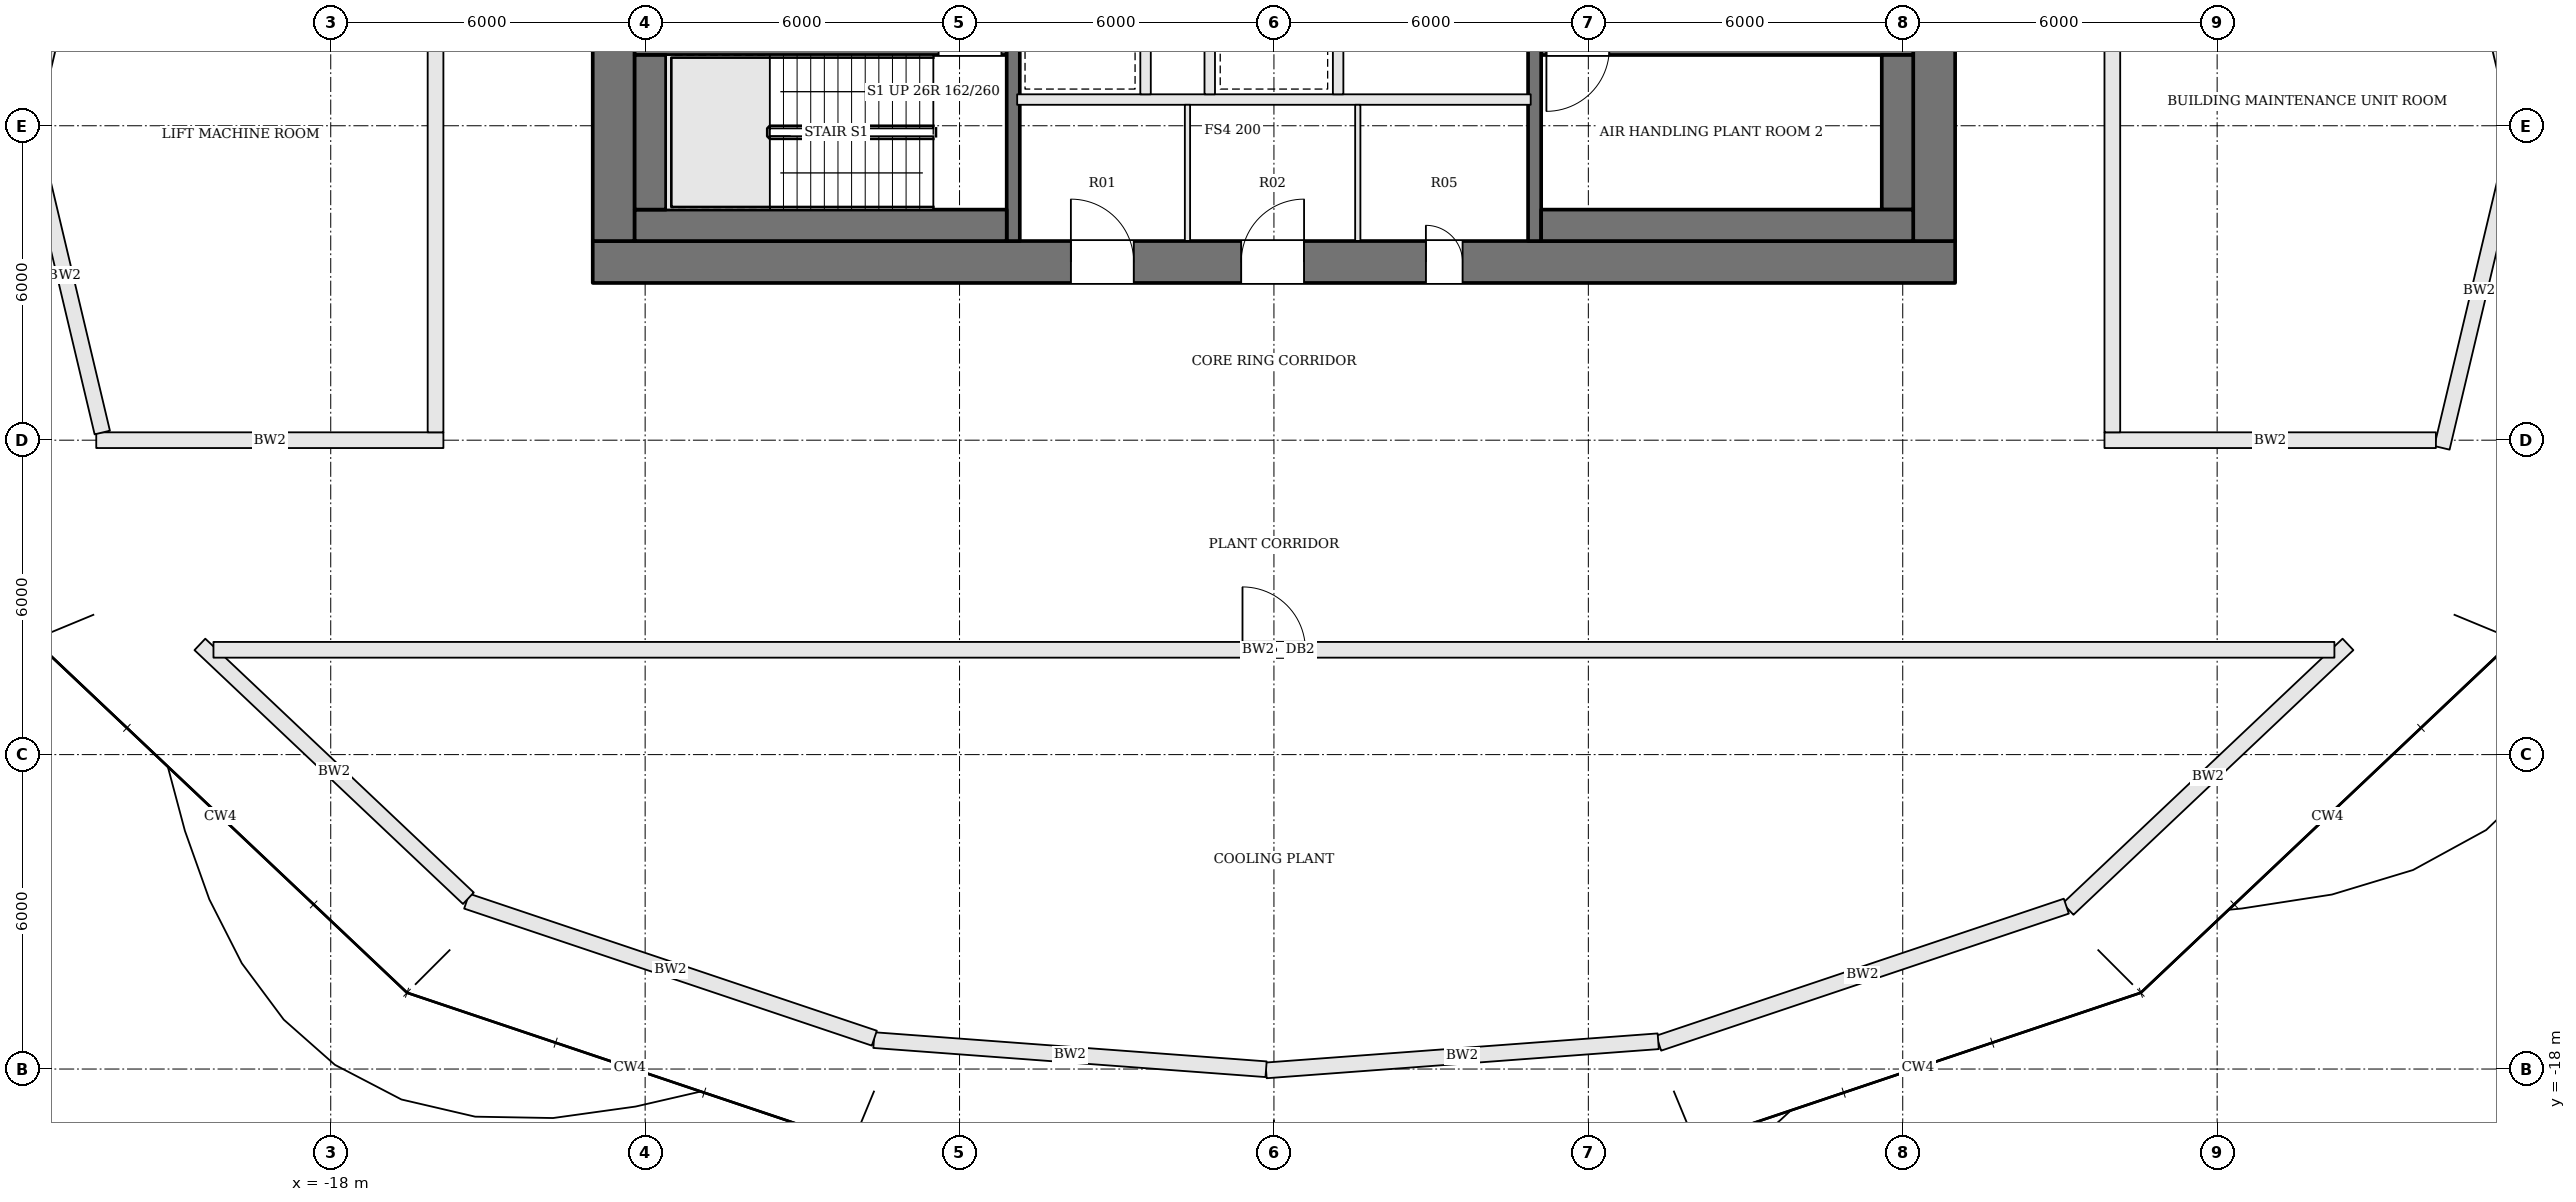
"""IFC4 building model, lengths in metres.
Left out: names, types, materials, properties, quantities, classifications, styles, units other than length and angle.
Written with IfcOpenShell. Run it as: python <this file> out.ifc"""

import sys

from ifc_helpers import new_model, si_unit, direction, frame, frame_2d, origin, place, context, subcontext, project, spatial, rectangle, extrude, element, fill, save


model = new_model("IFC4")
c1 = context("Model", 3, precision=1e-05, world=origin(), true_north=direction((0.0, 1.0)))
c2 = subcontext(c1, "Body", "Model", "MODEL_VIEW")
j1 = project(units=[si_unit("LENGTHUNIT", "METRE"), si_unit("PLANEANGLEUNIT", "RADIAN")], contexts=[c1])
p1 = place(None, origin())
s1 = spatial("IfcSite", under=j1, at=p1, CompositionType="ELEMENT")
p2 = place(p1, origin())
s2 = spatial("IfcBuilding", under=s1, at=p2, CompositionType="ELEMENT")
p3 = place(p2, frame((0.0, 0.0, 307.8)))
s3 = spatial("IfcBuildingStorey", under=s2, at=p3, CompositionType="ELEMENT", Elevation=307.8)
p4 = place(p3, frame((-13.0, -2.6, 0.0), z_axis=(0.0, 0.0, 1.0), x_axis=(1.0, 0.0, 0.0)))
e1 = element("IfcWall", 1, at=p4, inside=s3, PredefinedType="SHEAR", context=c2, shape_type="SweptSolid", body=[
    extrude(rectangle(XDim=26.0, YDim=0.8, at=frame_2d((13.0, 0.0))), origin(), (0.0, 0.0, 1.0), 4.2),
])
p5 = place(p4, frame((9.125, 0.0, 0.0)))
e2 = element("IfcOpeningElement", 2, at=p5, cuts=e1, PredefinedType="OPENING", context=c2, shape_type="SweptSolid", body=[
    extrude(rectangle(XDim=1.2, YDim=2.1, at=frame_2d((0.6, 1.05))), frame((0.0, 0.41, 0.0), z_axis=(0.0, -1.0, 0.0), x_axis=(1.0, 0.0, 0.0)), (0.0, 0.0, 1.0), 0.82),
])
p6 = place(p4, frame((12.375, 0.0, 0.0)))
e3 = element("IfcOpeningElement", 3, at=p6, cuts=e1, PredefinedType="OPENING", context=c2, shape_type="SweptSolid", body=[
    extrude(rectangle(XDim=1.2, YDim=2.1, at=frame_2d((0.6, 1.05))), frame((0.0, 0.41, 0.0), z_axis=(0.0, -1.0, 0.0), x_axis=(1.0, 0.0, 0.0)), (0.0, 0.0, 1.0), 0.82),
])
p7 = place(p4, frame((15.9, 0.0, 0.0)))
e4 = element("IfcOpeningElement", 4, at=p7, cuts=e1, PredefinedType="OPENING", context=c2, shape_type="SweptSolid", body=[
    extrude(rectangle(XDim=0.7, YDim=2.1, at=frame_2d((0.35, 1.05))), frame((0.0, 0.41, 0.0), z_axis=(0.0, -1.0, 0.0), x_axis=(1.0, 0.0, 0.0)), (0.0, 0.0, 1.0), 0.82),
])
p8 = place(p3, frame((12.6, -2.2, 0.0), z_axis=(0.0, 0.0, 1.0), x_axis=(0.0, 1.0, 0.0)))
e5 = element("IfcWall", 5, at=p8, inside=s3, PredefinedType="SHEAR", context=c2, shape_type="SweptSolid", body=[
    extrude(rectangle(XDim=13.4, YDim=0.8, at=frame_2d((6.7, 0.0))), origin(), (0.0, 0.0, 1.0), 4.2),
])
p9 = place(p8, frame((7.4, 0.0, 0.0)))
e6 = element("IfcOpeningElement", 6, at=p9, cuts=e5, PredefinedType="OPENING", context=c2, shape_type="SweptSolid", body=[
    extrude(rectangle(XDim=1.8, YDim=2.1, at=frame_2d((0.9, 1.05))), frame((0.0, 0.41, 0.0), z_axis=(0.0, -1.0, 0.0), x_axis=(1.0, 0.0, 0.0)), (0.0, 0.0, 1.0), 0.82),
])
p10 = place(p3, frame((-12.6, -2.2, 0.0), z_axis=(0.0, 0.0, 1.0), x_axis=(0.0, 1.0, 0.0)))
e7 = element("IfcWall", 7, at=p10, inside=s3, PredefinedType="SHEAR", context=c2, shape_type="SweptSolid", body=[
    extrude(rectangle(XDim=13.4, YDim=0.8, at=frame_2d((6.7, 0.0))), origin(), (0.0, 0.0, 1.0), 4.2),
])
p11 = place(p10, frame((4.2, 0.0, 0.0)))
e8 = element("IfcOpeningElement", 8, at=p11, cuts=e7, PredefinedType="OPENING", context=c2, shape_type="SweptSolid", body=[
    extrude(rectangle(XDim=1.8, YDim=2.1, at=frame_2d((0.9, 1.05))), frame((0.0, 0.41, 0.0), z_axis=(0.0, -1.0, 0.0), x_axis=(1.0, 0.0, 0.0)), (0.0, 0.0, 1.0), 0.82),
])
p12 = place(p3, frame((-12.2, 1.475, 0.0), z_axis=(0.0, 0.0, 1.0), x_axis=(1.0, 0.0, 0.0)))
e9 = element("IfcWall", 9, at=p12, inside=s3, PredefinedType="SOLIDWALL", context=c2, shape_type="SweptSolid", body=[
    extrude(rectangle(XDim=7.1, YDim=0.25, at=frame_2d((3.55, 0.0))), origin(), (0.0, 0.0, 1.0), 4.0),
])
p13 = place(p12, frame((5.8, 0.0, 0.0)))
e10 = element("IfcOpeningElement", 10, at=p13, cuts=e9, PredefinedType="OPENING", context=c2, shape_type="SweptSolid", body=[
    extrude(rectangle(XDim=1.2, YDim=2.1, at=frame_2d((0.6, 1.05))), frame((0.0, 0.135, 0.0), z_axis=(0.0, -1.0, 0.0), x_axis=(1.0, 0.0, 0.0)), (0.0, 0.0, 1.0), 0.27),
])
p14 = place(p3, frame((12.2, 1.475, 0.0), z_axis=(0.0, 0.0, 1.0), x_axis=(-1.0, 0.0, 0.0)))
e11 = element("IfcWall", 11, at=p14, inside=s3, PredefinedType="SOLIDWALL", context=c2, shape_type="SweptSolid", body=[
    extrude(rectangle(XDim=7.1, YDim=0.25, at=frame_2d((3.55, 0.0))), origin(), (0.0, 0.0, 1.0), 4.0),
])
p15 = place(p14, frame((5.8, 0.0, 0.0)))
e12 = element("IfcOpeningElement", 12, at=p15, cuts=e11, PredefinedType="OPENING", context=c2, shape_type="SweptSolid", body=[
    extrude(rectangle(XDim=1.2, YDim=2.1, at=frame_2d((0.6, 1.05))), frame((0.0, 0.135, 0.0), z_axis=(0.0, -1.0, 0.0), x_axis=(1.0, 0.0, 0.0)), (0.0, 0.0, 1.0), 0.27),
])
p16 = place(p3, frame((-4.975, -2.2, 0.0), z_axis=(0.0, 0.0, 1.0), x_axis=(0.0, 1.0, 0.0)))
e13 = element("IfcWall", 13, at=p16, inside=s3, PredefinedType="SOLIDWALL", context=c2, shape_type="SweptSolid", body=[
    extrude(rectangle(XDim=13.4, YDim=0.25, at=frame_2d((6.7, 0.0))), origin(), (0.0, 0.0, 1.0), 4.0),
])
p17 = place(p16, frame((5.25, 0.0, 0.0)))
e14 = element("IfcOpeningElement", 14, at=p17, cuts=e13, PredefinedType="OPENING", context=c2, shape_type="SweptSolid", body=[
    extrude(rectangle(XDim=1.2, YDim=2.1, at=frame_2d((0.6, 1.05))), frame((0.0, 0.135, 0.0), z_axis=(0.0, -1.0, 0.0), x_axis=(1.0, 0.0, 0.0)), (0.0, 0.0, 1.0), 0.27),
])
p18 = place(p3, frame((4.975, 11.2, 0.0), z_axis=(0.0, 0.0, 1.0), x_axis=(0.0, -1.0, 0.0)))
e15 = element("IfcWall", 15, at=p18, inside=s3, PredefinedType="SOLIDWALL", context=c2, shape_type="SweptSolid", body=[
    extrude(rectangle(XDim=13.4, YDim=0.25, at=frame_2d((6.7, 0.0))), origin(), (0.0, 0.0, 1.0), 4.0),
])
p19 = place(p18, frame((5.25, 0.0, 0.0)))
e16 = element("IfcOpeningElement", 16, at=p19, cuts=e15, PredefinedType="OPENING", context=c2, shape_type="SweptSolid", body=[
    extrude(rectangle(XDim=1.2, YDim=2.1, at=frame_2d((0.6, 1.05))), frame((0.0, 0.135, 0.0), z_axis=(0.0, -1.0, 0.0), x_axis=(1.0, 0.0, 0.0)), (0.0, 0.0, 1.0), 0.27),
])
p20 = place(p3, frame((-12.2, -1.9, 0.0), z_axis=(0.0, 0.0, 1.0), x_axis=(1.0, 0.0, 0.0)))
e17 = element("IfcWall", 17, at=p20, inside=s3, PredefinedType="SOLIDWALL", context=c2, shape_type="SweptSolid", body=[
    extrude(rectangle(XDim=7.1, YDim=0.6, at=frame_2d((3.55, 0.0))), origin(), (0.0, 0.0, 1.0), 4.0),
])
for number, where, z_axis, x_axis in (
    (18, (-11.9, -1.6, 0.0), (0.0, 0.0, 1.0), (0.0, 1.0, 0.0)),
    (19, (11.9, 1.35, 0.0), (0.0, 0.0, 1.0), (0.0, -1.0, 0.0)),
):
    element("IfcWall", number, at=place(p3, frame(where, z_axis=z_axis, x_axis=x_axis)), inside=s3, PredefinedType="SOLIDWALL", context=c2, shape_type="SweptSolid", body=[
        extrude(rectangle(XDim=2.95, YDim=0.6, at=frame_2d((1.475, 0.0))), origin(), (0.0, 0.0, 1.0), 4.0),
    ])
p21 = place(p3, frame((12.2, -1.9, 0.0), z_axis=(0.0, 0.0, 1.0), x_axis=(-1.0, 0.0, 0.0)))
e20 = element("IfcWall", 20, at=p21, inside=s3, PredefinedType="SOLIDWALL", context=c2, shape_type="SweptSolid", body=[
    extrude(rectangle(XDim=7.1, YDim=0.6, at=frame_2d((3.55, 0.0))), origin(), (0.0, 0.0, 1.0), 4.0),
])
p22 = place(p3, frame((-4.9, 0.5, 0.0), z_axis=(0.0, 0.0, 1.0), x_axis=(1.0, 0.0, 0.0)))
e21 = element("IfcWall", 21, at=p22, inside=s3, PredefinedType="SOLIDWALL", context=c2, shape_type="SweptSolid", body=[
    extrude(rectangle(XDim=9.8, YDim=0.2, at=frame_2d((4.9, 0.0))), origin(), (0.0, 0.0, 1.0), 4.0),
])
for number, where, z_axis, x_axis in (
    (22, (-2.45, 0.6, 0.0), (0.0, 0.0, 1.0), (0.0, 1.0, 0.0)),
    (23, (-1.225, 0.6, 0.0), (0.0, 0.0, 1.0), (0.0, 1.0, 0.0)),
    (24, (1.225, 0.6, 0.0), (0.0, 0.0, 1.0), (0.0, 1.0, 0.0)),
):
    element("IfcWall", number, at=place(p3, frame(where, z_axis=z_axis, x_axis=x_axis)), inside=s3, PredefinedType="SOLIDWALL", context=c2, shape_type="SweptSolid", body=[
        extrude(rectangle(XDim=2.2, YDim=0.2, at=frame_2d((1.1, 0.0))), origin(), (0.0, 0.0, 1.0), 4.0),
    ])
for number, where, z_axis, x_axis in (
    (25, (-1.65, -2.2, 0.0), (0.0, 0.0, 1.0), (0.0, 1.0, 0.0)),
    (26, (1.6, -2.2, 0.0), (0.0, 0.0, 1.0), (0.0, 1.0, 0.0)),
):
    element("IfcWall", number, at=place(p3, frame(where, z_axis=z_axis, x_axis=x_axis)), inside=s3, PredefinedType="PARTITIONING", context=c2, shape_type="SweptSolid", body=[
        extrude(rectangle(XDim=2.6, YDim=0.1, at=frame_2d((1.3, 0.0))), origin(), (0.0, 0.0, 1.0), 4.0),
    ])
p23 = place(p3, frame((-15.85, -6.0, 0.0), z_axis=(0.0, 0.0, 1.0), x_axis=(-1.0, 0.0, 0.0)))
e27 = element("IfcWall", 27, at=p23, inside=s3, PredefinedType="SOLIDWALL", context=c2, shape_type="SweptSolid", body=[
    extrude(rectangle(XDim=6.625, YDim=0.3, at=frame_2d((3.312, 0.0))), origin(), (0.0, 0.0, 1.0), 3.484),
])
p24 = place(p3, frame((-22.36, -5.854, 0.0), z_axis=(0.0, 0.0, 1.0), x_axis=(-0.231042450417, 0.972943670572, 0.0)))
e28 = element("IfcWall", 28, at=p24, inside=s3, PredefinedType="SOLIDWALL", context=c2, shape_type="SweptSolid", body=[
    extrude(rectangle(XDim=6.167, YDim=0.3, at=frame_2d((3.083, 0.0))), origin(), (0.0, 0.0, 1.0), 3.484),
])
p25 = place(p3, frame((-23.715, 0.146, 0.0), z_axis=(0.0, 0.0, 1.0), x_axis=(0.231081377849, 0.972934425751, 0.0)))
e29 = element("IfcWall", 29, at=p25, inside=s3, PredefinedType="SOLIDWALL", context=c2, shape_type="SweptSolid", body=[
    extrude(rectangle(XDim=9.041, YDim=0.3, at=frame_2d((4.52, 0.0))), origin(), (0.0, 0.0, 1.0), 3.484),
])
p26 = place(p3, frame((-16.0, 13.998, 0.0), z_axis=(0.0, 0.0, 1.0), x_axis=(0.0, -1.0, 0.0)))
e30 = element("IfcWall", 30, at=p26, inside=s3, PredefinedType="SOLIDWALL", context=c2, shape_type="SweptSolid", body=[
    extrude(rectangle(XDim=19.848, YDim=0.3, at=frame_2d((9.924, 0.0))), origin(), (0.0, 0.0, 1.0), 3.484),
])
p27 = place(p26, frame((8.998, 0.0, 0.0)))
e31 = element("IfcOpeningElement", 31, at=p27, cuts=e30, PredefinedType="OPENING", context=c2, shape_type="SweptSolid", body=[
    extrude(rectangle(XDim=1.0, YDim=2.1, at=frame_2d((0.5, 1.05))), frame((0.0, 0.16, 0.0), z_axis=(0.0, -1.0, 0.0), x_axis=(1.0, 0.0, 0.0)), (0.0, 0.0, 1.0), 0.32),
])
p28 = place(p3, frame((21.696, 8.65, 0.0), z_axis=(0.0, 0.0, 1.0), x_axis=(0.231055814684, -0.972940496896, 0.0)))
e32 = element("IfcWall", 32, at=p28, inside=s3, PredefinedType="SOLIDWALL", context=c2, shape_type="SweptSolid", body=[
    extrude(rectangle(XDim=9.041, YDim=0.3, at=frame_2d((4.52, 0.0))), origin(), (0.0, 0.0, 1.0), 3.484),
])
p29 = place(p3, frame((23.715, -0.146, 0.0), z_axis=(0.0, 0.0, 1.0), x_axis=(-0.231079925788, -0.972934770629, 0.0)))
e33 = element("IfcWall", 33, at=p29, inside=s3, PredefinedType="SOLIDWALL", context=c2, shape_type="SweptSolid", body=[
    extrude(rectangle(XDim=6.167, YDim=0.3, at=frame_2d((3.083, 0.0))), origin(), (0.0, 0.0, 1.0), 3.484),
])
p30 = place(p3, frame((22.175, -6.0, 0.0), z_axis=(0.0, 0.0, 1.0), x_axis=(-1.0, 0.0, 0.0)))
e34 = element("IfcWall", 34, at=p30, inside=s3, PredefinedType="SOLIDWALL", context=c2, shape_type="SweptSolid", body=[
    extrude(rectangle(XDim=6.325, YDim=0.3, at=frame_2d((3.163, 0.0))), origin(), (0.0, 0.0, 1.0), 3.484),
])
p31 = place(p3, frame((16.0, -5.85, 0.0), z_axis=(0.0, 0.0, 1.0), x_axis=(0.0, 1.0, 0.0)))
e35 = element("IfcWall", 35, at=p31, inside=s3, PredefinedType="SOLIDWALL", context=c2, shape_type="SweptSolid", body=[
    extrude(rectangle(XDim=19.848, YDim=0.3, at=frame_2d((9.924, 0.0))), origin(), (0.0, 0.0, 1.0), 3.484),
])
p32 = place(p31, frame((9.85, 0.0, 0.0)))
e36 = element("IfcOpeningElement", 36, at=p32, cuts=e35, PredefinedType="OPENING", context=c2, shape_type="SweptSolid", body=[
    extrude(rectangle(XDim=1.0, YDim=2.1, at=frame_2d((0.5, 1.05))), frame((0.0, 0.16, 0.0), z_axis=(0.0, -1.0, 0.0), x_axis=(1.0, 0.0, 0.0)), (0.0, 0.0, 1.0), 0.32),
])
p33 = place(p3, frame((20.497, -9.897, 0.0), z_axis=(0.0, 0.0, 1.0), x_axis=(-0.726687950855, -0.686967700902, 0.0)))
e37 = element("IfcWall", 37, at=p33, inside=s3, PredefinedType="SOLIDWALL", context=c2, shape_type="SweptSolid", body=[
    extrude(rectangle(XDim=7.351, YDim=0.3, at=frame_2d((3.676, 0.0))), origin(), (0.0, 0.0, 1.0), 3.484),
])
p34 = place(p3, frame((15.122, -14.892, 0.0), z_axis=(0.0, 0.0, 1.0), x_axis=(-0.947889107185, -0.318600440175, 0.0)))
e38 = element("IfcWall", 38, at=p34, inside=s3, PredefinedType="SOLIDWALL", context=c2, shape_type="SweptSolid", body=[
    extrude(rectangle(XDim=8.208, YDim=0.3, at=frame_2d((4.104, 0.0))), origin(), (0.0, 0.0, 1.0), 3.484),
])
p35 = place(p3, frame((7.334, -17.47, 0.0), z_axis=(0.0, 0.0, 1.0), x_axis=(-0.99725255451, -0.074076599028, 0.0)))
e39 = element("IfcWall", 39, at=p35, inside=s3, PredefinedType="SOLIDWALL", context=c2, shape_type="SweptSolid", body=[
    extrude(rectangle(XDim=7.504, YDim=0.3, at=frame_2d((3.752, 0.0))), origin(), (0.0, 0.0, 1.0), 3.484),
])
p36 = place(p3, frame((-0.15, -18.004, 0.0), z_axis=(0.0, 0.0, 1.0), x_axis=(-0.997252733018, 0.074074195827, 0.0)))
e40 = element("IfcWall", 40, at=p36, inside=s3, PredefinedType="SOLIDWALL", context=c2, shape_type="SweptSolid", body=[
    extrude(rectangle(XDim=7.505, YDim=0.3, at=frame_2d((3.752, 0.0))), origin(), (0.0, 0.0, 1.0), 3.484),
])
p37 = place(p3, frame((-7.626, -17.411, 0.0), z_axis=(0.0, 0.0, 1.0), x_axis=(-0.947889107185, 0.318600440175, 0.0)))
e41 = element("IfcWall", 41, at=p37, inside=s3, PredefinedType="SOLIDWALL", context=c2, shape_type="SweptSolid", body=[
    extrude(rectangle(XDim=8.208, YDim=0.3, at=frame_2d((4.104, 0.0))), origin(), (0.0, 0.0, 1.0), 3.484),
])
p38 = place(p3, frame((-15.373, -14.741, 0.0), z_axis=(0.0, 0.0, 1.0), x_axis=(-0.72668467972, 0.686971161156, 0.0)))
e42 = element("IfcWall", 42, at=p38, inside=s3, PredefinedType="SOLIDWALL", context=c2, shape_type="SweptSolid", body=[
    extrude(rectangle(XDim=7.051, YDim=0.3, at=frame_2d((3.526, 0.0))), origin(), (0.0, 0.0, 1.0), 3.484),
])
p39 = place(p3, frame((-20.238, -10.0, 0.0), z_axis=(0.0, 0.0, 1.0), x_axis=(1.0, 0.0, 0.0)))
e43 = element("IfcWall", 43, at=p39, inside=s3, PredefinedType="SOLIDWALL", context=c2, shape_type="SweptSolid", body=[
    extrude(rectangle(XDim=40.476, YDim=0.3, at=frame_2d((20.238, 0.0))), origin(), (0.0, 0.0, 1.0), 3.484),
])
p40 = place(p39, frame((19.638, 0.0, 0.0)))
e44 = element("IfcOpeningElement", 44, at=p40, cuts=e43, PredefinedType="OPENING", context=c2, shape_type="SweptSolid", body=[
    extrude(rectangle(XDim=1.2, YDim=2.1, at=frame_2d((0.6, 1.05))), frame((0.0, 0.16, 0.0), z_axis=(0.0, -1.0, 0.0), x_axis=(1.0, 0.0, 0.0)), (0.0, 0.0, 1.0), 0.32),
])
p41 = place(p5, origin())
e45 = element("IfcDoor", 45, at=p41, inside=s3, OperationType="SINGLE_SWING_LEFT", PredefinedType="DOOR", context=c2, shape_type="SweptSolid", body=[
    extrude(rectangle(XDim=1.2, YDim=2.1, at=frame_2d((0.6, 1.05))), frame((0.0, 0.025, 0.0), z_axis=(0.0, -1.0, 0.0), x_axis=(1.0, 0.0, 0.0)), (0.0, 0.0, 1.0), 0.05),
])
fill(e2, e45)
p42 = place(p6, origin())
e46 = element("IfcDoor", 46, at=p42, inside=s3, OperationType="SINGLE_SWING_RIGHT", PredefinedType="DOOR", context=c2, shape_type="SweptSolid", body=[
    extrude(rectangle(XDim=1.2, YDim=2.1, at=frame_2d((0.6, 1.05))), frame((0.0, 0.025, 0.0), z_axis=(0.0, -1.0, 0.0), x_axis=(1.0, 0.0, 0.0)), (0.0, 0.0, 1.0), 0.05),
])
fill(e3, e46)
p43 = place(p7, origin())
e47 = element("IfcDoor", 47, at=p43, inside=s3, OperationType="SINGLE_SWING_LEFT", PredefinedType="DOOR", context=c2, shape_type="SweptSolid", body=[
    extrude(rectangle(XDim=0.7, YDim=2.1, at=frame_2d((0.35, 1.05))), frame((0.0, 0.025, 0.0), z_axis=(0.0, -1.0, 0.0), x_axis=(1.0, 0.0, 0.0)), (0.0, 0.0, 1.0), 0.05),
])
fill(e4, e47)
p44 = place(p40, origin())
e48 = element("IfcDoor", 48, at=p44, inside=s3, OperationType="SINGLE_SWING_LEFT", PredefinedType="DOOR", context=c2, shape_type="SweptSolid", body=[
    extrude(rectangle(XDim=1.2, YDim=2.1, at=frame_2d((0.6, 1.05))), frame((0.0, 0.025, 0.0), z_axis=(0.0, -1.0, 0.0), x_axis=(1.0, 0.0, 0.0)), (0.0, 0.0, 1.0), 0.05),
])
fill(e44, e48)
save(model, sys.argv[1])
